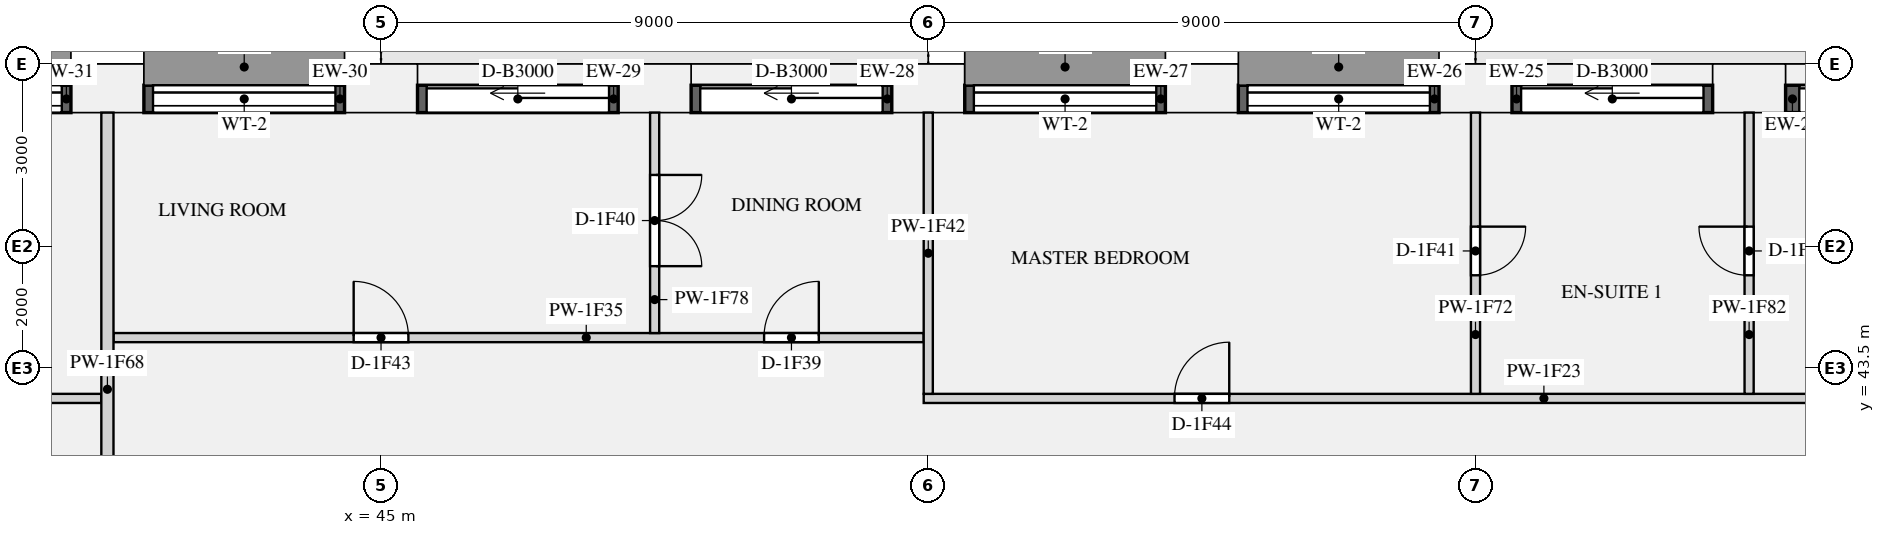
"""IFC4 building model, lengths in metres.
Left out: names, types, materials, properties, quantities, classifications, styles, units other than length and angle.
Written with IfcOpenShell. Run it as: python <this file> out.ifc"""

import sys

from ifc_helpers import new_model, si_unit, direction, frame, frame_2d, origin, origin_2d, place, context, subcontext, project, spatial, rectangle, extrude, element, fill, save


model = new_model("IFC4")
c1 = context("Model", 3, precision=1e-05, world=origin(), true_north=direction((0.0, 1.0)))
c2 = subcontext(c1, "Body", "Model", "MODEL_VIEW")
j1 = project(units=[si_unit("LENGTHUNIT", "METRE"), si_unit("PLANEANGLEUNIT", "RADIAN")], contexts=[c1])
p1 = place(None, origin())
s1 = spatial("IfcSite", under=j1, at=p1, CompositionType="ELEMENT")
p2 = place(p1, origin())
s2 = spatial("IfcBuilding", under=s1, at=p2, CompositionType="ELEMENT")
p3 = place(p2, frame((0.0, 0.0, 60.45)))
s3 = spatial("IfcBuildingStorey", under=s2, at=p3, CompositionType="ELEMENT", Elevation=60.45)
for number, where, z_axis, x_axis in (
    (1, (67.5, 48.1, 0.0), (0.0, 0.0, 1.0), (-1.0, 0.0, 0.0)),
    (2, (63.0, 48.1, 0.0), (0.0, 0.0, 1.0), (-1.0, 0.0, 0.0)),
    (3, (58.5, 48.1, 0.0), (0.0, 0.0, 1.0), (-1.0, 0.0, 0.0)),
    (4, (54.0, 48.1, 0.0), (0.0, 0.0, 1.0), (-1.0, 0.0, 0.0)),
    (5, (49.5, 48.1, 0.0), (0.0, 0.0, 1.0), (-1.0, 0.0, 0.0)),
    (6, (45.0, 48.1, 0.0), (0.0, 0.0, 1.0), (-1.0, 0.0, 0.0)),
    (7, (40.5, 48.1, 0.0), (0.0, 0.0, 1.0), (-1.0, 0.0, 0.0)),
):
    element("IfcColumn", number, at=place(p3, frame(where, z_axis=z_axis, x_axis=x_axis)), inside=s3, PredefinedType="USERDEFINED", context=c2, shape_type="SweptSolid", body=[
        extrude(rectangle(XDim=1.2, YDim=0.8, at=origin_2d()), origin(), (0.0, 0.0, 1.0), 3.15),
    ])
p4 = place(p3, frame((70.8, 47.925, 0.0), z_axis=(0.0, 0.0, 1.0), x_axis=(-1.0, 0.0, 0.0)))
e8 = element("IfcWall", 8, at=p4, inside=s3, PredefinedType="SOLIDWALL", context=c2, shape_type="SweptSolid", body=[
    extrude(rectangle(XDim=2.7, YDim=0.45, at=frame_2d((1.35, 0.0))), origin(), (0.0, 0.0, 1.0), 2.83),
])
p5 = place(p4, frame((0.225, 0.0, 0.0)))
e9 = element("IfcOpeningElement", 9, at=p5, cuts=e8, PredefinedType="OPENING", context=c2, shape_type="SweptSolid", body=[
    extrude(rectangle(XDim=2.25, YDim=2.3, at=frame_2d((1.125, 1.15))), frame((0.0, 0.235, 0.0), z_axis=(0.0, -1.0, 0.0), x_axis=(1.0, 0.0, 0.0)), (0.0, 0.0, 1.0), 0.47),
])
p6 = place(p3, frame((66.9, 47.925, 0.0), z_axis=(0.0, 0.0, 1.0), x_axis=(-1.0, 0.0, 0.0)))
e10 = element("IfcWall", 10, at=p6, inside=s3, PredefinedType="SOLIDWALL", context=c2, shape_type="SweptSolid", body=[
    extrude(rectangle(XDim=3.3, YDim=0.45, at=frame_2d((1.65, 0.0))), origin(), (0.0, 0.0, 1.0), 2.83),
])
p7 = place(p6, frame((0.15, 0.0, 0.0)))
e11 = element("IfcOpeningElement", 11, at=p7, cuts=e10, PredefinedType="OPENING", context=c2, shape_type="SweptSolid", body=[
    extrude(rectangle(XDim=3.0, YDim=2.3, at=frame_2d((1.5, 1.15))), frame((0.0, 0.235, 0.0), z_axis=(0.0, -1.0, 0.0), x_axis=(1.0, 0.0, 0.0)), (0.0, 0.0, 1.0), 0.47),
])
p8 = place(p3, frame((62.4, 47.925, 0.9), z_axis=(0.0, 0.0, 1.0), x_axis=(-1.0, 0.0, 0.0)))
e12 = element("IfcWall", 12, at=p8, inside=s3, PredefinedType="SOLIDWALL", context=c2, shape_type="SweptSolid", body=[
    extrude(rectangle(XDim=3.3, YDim=0.45, at=frame_2d((1.65, 0.0))), origin(), (0.0, 0.0, 1.0), 1.93),
])
p9 = place(p8, frame((0.15, 0.0, 0.15)))
e13 = element("IfcOpeningElement", 13, at=p9, cuts=e12, PredefinedType="OPENING", context=c2, shape_type="SweptSolid", body=[
    extrude(rectangle(XDim=3.0, YDim=1.5, at=frame_2d((1.5, 0.75))), frame((0.0, 0.235, 0.0), z_axis=(0.0, -1.0, 0.0), x_axis=(1.0, 0.0, 0.0)), (0.0, 0.0, 1.0), 0.47),
])
p10 = place(p3, frame((57.9, 47.925, 0.9), z_axis=(0.0, 0.0, 1.0), x_axis=(-1.0, 0.0, 0.0)))
e14 = element("IfcWall", 14, at=p10, inside=s3, PredefinedType="SOLIDWALL", context=c2, shape_type="SweptSolid", body=[
    extrude(rectangle(XDim=3.3, YDim=0.45, at=frame_2d((1.65, 0.0))), origin(), (0.0, 0.0, 1.0), 1.93),
])
p11 = place(p10, frame((0.15, 0.0, 0.15)))
e15 = element("IfcOpeningElement", 15, at=p11, cuts=e14, PredefinedType="OPENING", context=c2, shape_type="SweptSolid", body=[
    extrude(rectangle(XDim=3.0, YDim=1.5, at=frame_2d((1.5, 0.75))), frame((0.0, 0.235, 0.0), z_axis=(0.0, -1.0, 0.0), x_axis=(1.0, 0.0, 0.0)), (0.0, 0.0, 1.0), 0.47),
])
p12 = place(p3, frame((53.4, 47.925, 0.0), z_axis=(0.0, 0.0, 1.0), x_axis=(-1.0, 0.0, 0.0)))
e16 = element("IfcWall", 16, at=p12, inside=s3, PredefinedType="SOLIDWALL", context=c2, shape_type="SweptSolid", body=[
    extrude(rectangle(XDim=3.3, YDim=0.45, at=frame_2d((1.65, 0.0))), origin(), (0.0, 0.0, 1.0), 2.83),
])
p13 = place(p12, frame((0.15, 0.0, 0.0)))
e17 = element("IfcOpeningElement", 17, at=p13, cuts=e16, PredefinedType="OPENING", context=c2, shape_type="SweptSolid", body=[
    extrude(rectangle(XDim=3.0, YDim=2.3, at=frame_2d((1.5, 1.15))), frame((0.0, 0.235, 0.0), z_axis=(0.0, -1.0, 0.0), x_axis=(1.0, 0.0, 0.0)), (0.0, 0.0, 1.0), 0.47),
])
p14 = place(p3, frame((48.9, 47.925, 0.0), z_axis=(0.0, 0.0, 1.0), x_axis=(-1.0, 0.0, 0.0)))
e18 = element("IfcWall", 18, at=p14, inside=s3, PredefinedType="SOLIDWALL", context=c2, shape_type="SweptSolid", body=[
    extrude(rectangle(XDim=3.3, YDim=0.45, at=frame_2d((1.65, 0.0))), origin(), (0.0, 0.0, 1.0), 2.83),
])
p15 = place(p14, frame((0.15, 0.0, 0.0)))
e19 = element("IfcOpeningElement", 19, at=p15, cuts=e18, PredefinedType="OPENING", context=c2, shape_type="SweptSolid", body=[
    extrude(rectangle(XDim=3.0, YDim=2.3, at=frame_2d((1.5, 1.15))), frame((0.0, 0.235, 0.0), z_axis=(0.0, -1.0, 0.0), x_axis=(1.0, 0.0, 0.0)), (0.0, 0.0, 1.0), 0.47),
])
p16 = place(p3, frame((44.4, 47.925, 0.9), z_axis=(0.0, 0.0, 1.0), x_axis=(-1.0, 0.0, 0.0)))
e20 = element("IfcWall", 20, at=p16, inside=s3, PredefinedType="SOLIDWALL", context=c2, shape_type="SweptSolid", body=[
    extrude(rectangle(XDim=3.3, YDim=0.45, at=frame_2d((1.65, 0.0))), origin(), (0.0, 0.0, 1.0), 1.93),
])
p17 = place(p16, frame((0.15, 0.0, 0.15)))
e21 = element("IfcOpeningElement", 21, at=p17, cuts=e20, PredefinedType="OPENING", context=c2, shape_type="SweptSolid", body=[
    extrude(rectangle(XDim=3.0, YDim=1.5, at=frame_2d((1.5, 0.75))), frame((0.0, 0.235, 0.0), z_axis=(0.0, -1.0, 0.0), x_axis=(1.0, 0.0, 0.0)), (0.0, 0.0, 1.0), 0.47),
])
p18 = place(p3, frame((39.9, 47.925, 0.9), z_axis=(0.0, 0.0, 1.0), x_axis=(-1.0, 0.0, 0.0)))
e22 = element("IfcWall", 22, at=p18, inside=s3, PredefinedType="SOLIDWALL", context=c2, shape_type="SweptSolid", body=[
    extrude(rectangle(XDim=3.3, YDim=0.45, at=frame_2d((1.65, 0.0))), origin(), (0.0, 0.0, 1.0), 1.93),
])
p19 = place(p18, frame((0.15, 0.0, 0.15)))
e23 = element("IfcOpeningElement", 23, at=p19, cuts=e22, PredefinedType="OPENING", context=c2, shape_type="SweptSolid", body=[
    extrude(rectangle(XDim=3.0, YDim=1.5, at=frame_2d((1.5, 0.75))), frame((0.0, 0.235, 0.0), z_axis=(0.0, -1.0, 0.0), x_axis=(1.0, 0.0, 0.0)), (0.0, 0.0, 1.0), 0.47),
])
p20 = place(p3, frame((18.075, 43.0, 0.0), z_axis=(0.0, 0.0, 1.0), x_axis=(1.0, 0.0, 0.0)))
e24 = element("IfcWall", 24, at=p20, inside=s3, PredefinedType="PARTITIONING", context=c2, shape_type="SweptSolid", body=[
    extrude(rectangle(XDim=22.325, YDim=0.15, at=frame_2d((11.163, 0.0))), origin(), (0.0, 0.0, 1.0), 2.83),
])
p21 = place(p20, frame((17.175, 0.0, 0.0)))
e25 = element("IfcOpeningElement", 25, at=p21, cuts=e24, PredefinedType="OPENING", context=c2, shape_type="SweptSolid", body=[
    extrude(rectangle(XDim=1.5, YDim=2.1, at=frame_2d((0.75, 1.05))), frame((0.0, 0.085, 0.0), z_axis=(0.0, -1.0, 0.0), x_axis=(1.0, 0.0, 0.0)), (0.0, 0.0, 1.0), 0.17),
])
p22 = place(p20, frame((11.475, 0.0, 0.0)))
e26 = element("IfcOpeningElement", 26, at=p22, cuts=e24, PredefinedType="OPENING", context=c2, shape_type="SweptSolid", body=[
    extrude(rectangle(XDim=0.9, YDim=2.1, at=frame_2d((0.45, 1.05))), frame((0.0, 0.085, 0.0), z_axis=(0.0, -1.0, 0.0), x_axis=(1.0, 0.0, 0.0)), (0.0, 0.0, 1.0), 0.17),
])
p23 = place(p20, frame((2.475, 0.0, 0.0)))
e27 = element("IfcOpeningElement", 27, at=p23, cuts=e24, PredefinedType="OPENING", context=c2, shape_type="SweptSolid", body=[
    extrude(rectangle(XDim=0.9, YDim=2.1, at=frame_2d((0.45, 1.05))), frame((0.0, 0.085, 0.0), z_axis=(0.0, -1.0, 0.0), x_axis=(1.0, 0.0, 0.0)), (0.0, 0.0, 1.0), 0.17),
])
p24 = place(p3, frame((53.925, 43.0, 0.0), z_axis=(0.0, 0.0, 1.0), x_axis=(1.0, 0.0, 0.0)))
e28 = element("IfcWall", 28, at=p24, inside=s3, PredefinedType="PARTITIONING", context=c2, shape_type="SweptSolid", body=[
    extrude(rectangle(XDim=18.0, YDim=0.15, at=frame_2d((9.0, 0.0))), origin(), (0.0, 0.0, 1.0), 2.83),
])
p25 = place(p24, frame((15.375, 0.0, 0.0)))
e29 = element("IfcOpeningElement", 29, at=p25, cuts=e28, PredefinedType="OPENING", context=c2, shape_type="SweptSolid", body=[
    extrude(rectangle(XDim=0.9, YDim=2.1, at=frame_2d((0.45, 1.05))), frame((0.0, 0.085, 0.0), z_axis=(0.0, -1.0, 0.0), x_axis=(1.0, 0.0, 0.0)), (0.0, 0.0, 1.0), 0.17),
])
p26 = place(p24, frame((4.125, 0.0, 0.0)))
e30 = element("IfcOpeningElement", 30, at=p26, cuts=e28, PredefinedType="OPENING", context=c2, shape_type="SweptSolid", body=[
    extrude(rectangle(XDim=0.9, YDim=2.1, at=frame_2d((0.45, 1.05))), frame((0.0, 0.085, 0.0), z_axis=(0.0, -1.0, 0.0), x_axis=(1.0, 0.0, 0.0)), (0.0, 0.0, 1.0), 0.17),
])
p27 = place(p3, frame((40.6, 44.0, 0.0), z_axis=(0.0, 0.0, 1.0), x_axis=(1.0, 0.0, 0.0)))
e31 = element("IfcWall", 31, at=p27, inside=s3, PredefinedType="PARTITIONING", context=c2, shape_type="SweptSolid", body=[
    extrude(rectangle(XDim=13.325, YDim=0.15, at=frame_2d((6.663, 0.0))), origin(), (0.0, 0.0, 1.0), 2.83),
])
p28 = place(p27, frame((10.7, 0.0, 0.0)))
e32 = element("IfcOpeningElement", 32, at=p28, cuts=e31, PredefinedType="OPENING", context=c2, shape_type="SweptSolid", body=[
    extrude(rectangle(XDim=0.9, YDim=2.1, at=frame_2d((0.45, 1.05))), frame((0.0, 0.085, 0.0), z_axis=(0.0, -1.0, 0.0), x_axis=(1.0, 0.0, 0.0)), (0.0, 0.0, 1.0), 0.17),
])
p29 = place(p27, frame((3.95, 0.0, 0.0)))
e33 = element("IfcOpeningElement", 33, at=p29, cuts=e31, PredefinedType="OPENING", context=c2, shape_type="SweptSolid", body=[
    extrude(rectangle(XDim=0.9, YDim=2.1, at=frame_2d((0.45, 1.05))), frame((0.0, 0.085, 0.0), z_axis=(0.0, -1.0, 0.0), x_axis=(1.0, 0.0, 0.0)), (0.0, 0.0, 1.0), 0.17),
])
p30 = place(p3, frame((54.0, 43.075, 0.0), z_axis=(0.0, 0.0, 1.0), x_axis=(0.0, 1.0, 0.0)))
e34 = element("IfcWall", 34, at=p30, inside=s3, PredefinedType="PARTITIONING", context=c2, shape_type="SweptSolid", body=[
    extrude(rectangle(XDim=4.625, YDim=0.15, at=frame_2d((2.312, 0.0))), origin(), (0.0, 0.0, 1.0), 2.83),
])
p31 = place(p3, frame((40.5, 38.6, 0.0), z_axis=(0.0, 0.0, 1.0), x_axis=(0.0, 1.0, 0.0)))
e35 = element("IfcWall", 35, at=p31, inside=s3, PredefinedType="PARTITIONING", context=c2, shape_type="SweptSolid", body=[
    extrude(rectangle(XDim=9.1, YDim=0.2, at=frame_2d((4.55, 0.0))), origin(), (0.0, 0.0, 1.0), 2.83),
])
p32 = place(p3, frame((63.0, 43.075, 0.0), z_axis=(0.0, 0.0, 1.0), x_axis=(0.0, 1.0, 0.0)))
e36 = element("IfcWall", 36, at=p32, inside=s3, PredefinedType="PARTITIONING", context=c2, shape_type="SweptSolid", body=[
    extrude(rectangle(XDim=4.625, YDim=0.15, at=frame_2d((2.312, 0.0))), origin(), (0.0, 0.0, 1.0), 2.83),
])
p33 = place(p32, frame((1.95, 0.0, 0.0)))
e37 = element("IfcOpeningElement", 37, at=p33, cuts=e36, PredefinedType="OPENING", context=c2, shape_type="SweptSolid", body=[
    extrude(rectangle(XDim=0.8, YDim=2.1, at=frame_2d((0.4, 1.05))), frame((0.0, 0.085, 0.0), z_axis=(0.0, -1.0, 0.0), x_axis=(1.0, 0.0, 0.0)), (0.0, 0.0, 1.0), 0.17),
])
p34 = place(p3, frame((49.5, 44.075, 0.0), z_axis=(0.0, 0.0, 1.0), x_axis=(0.0, 1.0, 0.0)))
e38 = element("IfcWall", 38, at=p34, inside=s3, PredefinedType="PARTITIONING", context=c2, shape_type="SweptSolid", body=[
    extrude(rectangle(XDim=3.625, YDim=0.15, at=frame_2d((1.812, 0.0))), origin(), (0.0, 0.0, 1.0), 2.83),
])
p35 = place(p34, frame((1.1, 0.0, 0.0)))
e39 = element("IfcOpeningElement", 39, at=p35, cuts=e38, PredefinedType="OPENING", context=c2, shape_type="SweptSolid", body=[
    extrude(rectangle(XDim=1.5, YDim=2.1, at=frame_2d((0.75, 1.05))), frame((0.0, 0.085, 0.0), z_axis=(0.0, -1.0, 0.0), x_axis=(1.0, 0.0, 0.0)), (0.0, 0.0, 1.0), 0.17),
])
p36 = place(p3, frame((67.5, 43.075, 0.0), z_axis=(0.0, 0.0, 1.0), x_axis=(0.0, 1.0, 0.0)))
e40 = element("IfcWall", 40, at=p36, inside=s3, PredefinedType="PARTITIONING", context=c2, shape_type="SweptSolid", body=[
    extrude(rectangle(XDim=4.625, YDim=0.15, at=frame_2d((2.312, 0.0))), origin(), (0.0, 0.0, 1.0), 2.83),
])
p37 = place(p36, frame((1.95, 0.0, 0.0)))
e41 = element("IfcOpeningElement", 41, at=p37, cuts=e40, PredefinedType="OPENING", context=c2, shape_type="SweptSolid", body=[
    extrude(rectangle(XDim=0.8, YDim=2.1, at=frame_2d((0.4, 1.05))), frame((0.0, 0.085, 0.0), z_axis=(0.0, -1.0, 0.0), x_axis=(1.0, 0.0, 0.0)), (0.0, 0.0, 1.0), 0.17),
])
p38 = place(p5, origin())
e42 = element("IfcDoor", 42, at=p38, inside=s3, OperationType="SLIDING_TO_LEFT", PredefinedType="DOOR", context=c2, shape_type="SweptSolid", body=[
    extrude(rectangle(XDim=2.25, YDim=2.3, at=frame_2d((1.125, 1.15))), frame((0.0, -0.07, 0.0), z_axis=(0.0, -1.0, 0.0), x_axis=(1.0, 0.0, 0.0)), (0.0, 0.0, 1.0), 0.05),
])
fill(e9, e42)
p39 = place(p7, origin())
e43 = element("IfcDoor", 43, at=p39, inside=s3, OperationType="SLIDING_TO_LEFT", PredefinedType="DOOR", context=c2, shape_type="SweptSolid", body=[
    extrude(rectangle(XDim=3.0, YDim=2.3, at=frame_2d((1.5, 1.15))), frame((0.0, -0.07, 0.0), z_axis=(0.0, -1.0, 0.0), x_axis=(1.0, 0.0, 0.0)), (0.0, 0.0, 1.0), 0.05),
])
fill(e11, e43)
p40 = place(p9, origin())
e44 = element("IfcWindow", 44, at=p40, inside=s3, PartitioningType="SINGLE_PANEL", PredefinedType="WINDOW", context=c2, shape_type="SweptSolid", body=[
    extrude(rectangle(XDim=3.0, YDim=1.5, at=frame_2d((1.5, 0.75))), frame((0.0, -0.065, 0.0), z_axis=(0.0, -1.0, 0.0), x_axis=(1.0, 0.0, 0.0)), (0.0, 0.0, 1.0), 0.06),
])
fill(e13, e44)
p41 = place(p11, origin())
e45 = element("IfcWindow", 45, at=p41, inside=s3, PartitioningType="SINGLE_PANEL", PredefinedType="WINDOW", context=c2, shape_type="SweptSolid", body=[
    extrude(rectangle(XDim=3.0, YDim=1.5, at=frame_2d((1.5, 0.75))), frame((0.0, -0.065, 0.0), z_axis=(0.0, -1.0, 0.0), x_axis=(1.0, 0.0, 0.0)), (0.0, 0.0, 1.0), 0.06),
])
fill(e15, e45)
p42 = place(p13, origin())
e46 = element("IfcDoor", 46, at=p42, inside=s3, OperationType="SLIDING_TO_LEFT", PredefinedType="DOOR", context=c2, shape_type="SweptSolid", body=[
    extrude(rectangle(XDim=3.0, YDim=2.3, at=frame_2d((1.5, 1.15))), frame((0.0, -0.07, 0.0), z_axis=(0.0, -1.0, 0.0), x_axis=(1.0, 0.0, 0.0)), (0.0, 0.0, 1.0), 0.05),
])
fill(e17, e46)
p43 = place(p15, origin())
e47 = element("IfcDoor", 47, at=p43, inside=s3, OperationType="SLIDING_TO_LEFT", PredefinedType="DOOR", context=c2, shape_type="SweptSolid", body=[
    extrude(rectangle(XDim=3.0, YDim=2.3, at=frame_2d((1.5, 1.15))), frame((0.0, -0.07, 0.0), z_axis=(0.0, -1.0, 0.0), x_axis=(1.0, 0.0, 0.0)), (0.0, 0.0, 1.0), 0.05),
])
fill(e19, e47)
p44 = place(p17, origin())
e48 = element("IfcWindow", 48, at=p44, inside=s3, PartitioningType="SINGLE_PANEL", PredefinedType="WINDOW", context=c2, shape_type="SweptSolid", body=[
    extrude(rectangle(XDim=3.0, YDim=1.5, at=frame_2d((1.5, 0.75))), frame((0.0, -0.065, 0.0), z_axis=(0.0, -1.0, 0.0), x_axis=(1.0, 0.0, 0.0)), (0.0, 0.0, 1.0), 0.06),
])
fill(e21, e48)
p45 = place(p19, origin())
e49 = element("IfcWindow", 49, at=p45, inside=s3, PartitioningType="SINGLE_PANEL", PredefinedType="WINDOW", context=c2, shape_type="SweptSolid", body=[
    extrude(rectangle(XDim=3.0, YDim=1.5, at=frame_2d((1.5, 0.75))), frame((0.0, -0.065, 0.0), z_axis=(0.0, -1.0, 0.0), x_axis=(1.0, 0.0, 0.0)), (0.0, 0.0, 1.0), 0.06),
])
fill(e23, e49)
p46 = place(p37, origin())
e50 = element("IfcDoor", 50, at=p46, inside=s3, OperationType="SINGLE_SWING_RIGHT", PredefinedType="DOOR", context=c2, shape_type="SweptSolid", body=[
    extrude(rectangle(XDim=0.8, YDim=2.1, at=frame_2d((0.4, 1.05))), frame((0.0, 0.025, 0.0), z_axis=(0.0, -1.0, 0.0), x_axis=(1.0, 0.0, 0.0)), (0.0, 0.0, 1.0), 0.05),
])
fill(e41, e50)
p47 = place(p28, origin())
e51 = element("IfcDoor", 51, at=p47, inside=s3, OperationType="SINGLE_SWING_RIGHT", PredefinedType="DOOR", context=c2, shape_type="SweptSolid", body=[
    extrude(rectangle(XDim=0.9, YDim=2.1, at=frame_2d((0.45, 1.05))), frame((0.0, 0.025, 0.0), z_axis=(0.0, -1.0, 0.0), x_axis=(1.0, 0.0, 0.0)), (0.0, 0.0, 1.0), 0.05),
])
fill(e32, e51)
p48 = place(p35, frame((1.5, 0.0, 0.0), z_axis=(0.0, 0.0, 1.0), x_axis=(-1.0, 0.0, 0.0)))
e52 = element("IfcDoor", 52, at=p48, inside=s3, OperationType="DOUBLE_DOOR_SINGLE_SWING", PredefinedType="DOOR", context=c2, shape_type="SweptSolid", body=[
    extrude(rectangle(XDim=1.5, YDim=2.1, at=frame_2d((0.75, 1.05))), frame((0.0, 0.025, 0.0), z_axis=(0.0, -1.0, 0.0), x_axis=(1.0, 0.0, 0.0)), (0.0, 0.0, 1.0), 0.05),
])
fill(e39, e52)
p49 = place(p33, frame((0.8, 0.0, 0.0), z_axis=(0.0, 0.0, 1.0), x_axis=(-1.0, 0.0, 0.0)))
e53 = element("IfcDoor", 53, at=p49, inside=s3, OperationType="SINGLE_SWING_LEFT", PredefinedType="DOOR", context=c2, shape_type="SweptSolid", body=[
    extrude(rectangle(XDim=0.8, YDim=2.1, at=frame_2d((0.4, 1.05))), frame((0.0, 0.025, 0.0), z_axis=(0.0, -1.0, 0.0), x_axis=(1.0, 0.0, 0.0)), (0.0, 0.0, 1.0), 0.05),
])
fill(e37, e53)
p50 = place(p29, origin())
e54 = element("IfcDoor", 54, at=p50, inside=s3, OperationType="SINGLE_SWING_LEFT", PredefinedType="DOOR", context=c2, shape_type="SweptSolid", body=[
    extrude(rectangle(XDim=0.9, YDim=2.1, at=frame_2d((0.45, 1.05))), frame((0.0, 0.025, 0.0), z_axis=(0.0, -1.0, 0.0), x_axis=(1.0, 0.0, 0.0)), (0.0, 0.0, 1.0), 0.05),
])
fill(e33, e54)
p51 = place(p26, origin())
e55 = element("IfcDoor", 55, at=p51, inside=s3, OperationType="SINGLE_SWING_RIGHT", PredefinedType="DOOR", context=c2, shape_type="SweptSolid", body=[
    extrude(rectangle(XDim=0.9, YDim=2.1, at=frame_2d((0.45, 1.05))), frame((0.0, 0.025, 0.0), z_axis=(0.0, -1.0, 0.0), x_axis=(1.0, 0.0, 0.0)), (0.0, 0.0, 1.0), 0.05),
])
fill(e30, e55)
save(model, sys.argv[1])
